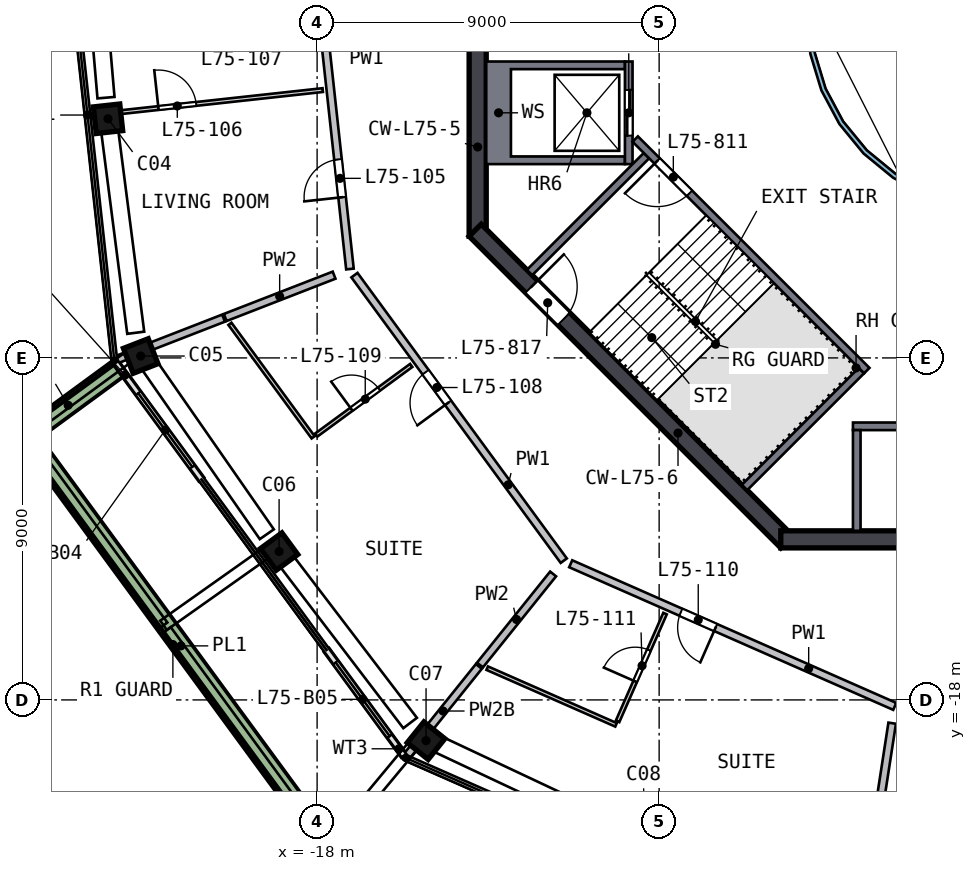
"""IFC4 building model, lengths in metres.
Left out: names, types, materials, properties, quantities, classifications, styles, units other than length and angle.
Written with IfcOpenShell. Run it as: python <this file> out.ifc"""

import sys

from ifc_helpers import new_model, si_unit, direction, frame, frame_2d, origin, origin_2d, place, context, subcontext, project, spatial, polyline, rectangle, outline, extrude, element, fill, save


model = new_model("IFC4")
c1 = context("Model", 3, precision=1e-05, world=origin(), true_north=direction((0.0, 1.0)))
c2 = subcontext(c1, "Body", "Model", "MODEL_VIEW")
j1 = project(units=[si_unit("LENGTHUNIT", "METRE"), si_unit("PLANEANGLEUNIT", "RADIAN")], contexts=[c1])
p1 = place(None, origin())
s1 = spatial("IfcSite", under=j1, at=p1, CompositionType="ELEMENT")
p2 = place(p1, origin())
s2 = spatial("IfcBuilding", under=s1, at=p2, CompositionType="ELEMENT")
p3 = place(p2, frame((0.0, 0.0, 303.0)))
s3 = spatial("IfcBuildingStorey", under=s2, at=p3, CompositionType="ELEMENT", Elevation=303.0)
p4 = place(p3, frame((-23.518, -2.572, 0.0), z_axis=(0.013232359, -0.111790618, 0.99364368), x_axis=(0.108422299, -0.987711126, -0.112567032)))
e1 = element("IfcColumn", 1, at=p4, inside=s3, PredefinedType="COLUMN", context=c2, shape_type="SweptSolid", body=[
    extrude(rectangle(XDim=0.7, YDim=0.7, at=origin_2d()), origin(), (0.0, 0.0, 1.0), 3.21),
])
p5 = place(p3, frame((-22.694, -8.821, 0.0), z_axis=(0.042875436, -0.107492672, 0.993280938), x_axis=(-0.36014885, 0.925689354, 0.115723917)))
e2 = element("IfcColumn", 2, at=p5, inside=s3, PredefinedType="COLUMN", context=c2, shape_type="SweptSolid", body=[
    extrude(rectangle(XDim=0.7, YDim=0.7, at=origin_2d()), origin(), (0.0, 0.0, 1.0), 3.211),
])
p6 = place(p3, frame((-19.082, -13.986, 0.0), z_axis=(0.067302778, -0.090193328, 0.993647573), x_axis=(0.58747426, -0.801380305, -0.112532662)))
e3 = element("IfcColumn", 3, at=p6, inside=s3, PredefinedType="COLUMN", context=c2, shape_type="SweptSolid", body=[
    extrude(rectangle(XDim=0.7, YDim=0.7, at=origin_2d()), origin(), (0.0, 0.0, 1.0), 3.21),
])
p7 = place(p3, frame((-15.243, -18.986, 0.0), z_axis=(0.090919185, -0.0717623, 0.993269286), x_axis=(-0.774414013, 0.621986949, 0.115823882)))
e4 = element("IfcColumn", 4, at=p7, inside=s3, PredefinedType="COLUMN", context=c2, shape_type="SweptSolid", body=[
    extrude(rectangle(XDim=0.7, YDim=0.7, at=origin_2d()), origin(), (0.0, 0.0, 1.0), 3.212),
])
p8 = place(p3, frame((-13.775, 5.799, 0.0), z_axis=(0.0, 0.0, 1.0), x_axis=(0.0, -1.0, 0.0)))
e5 = element("IfcWall", 5, at=p8, inside=s3, PredefinedType="SHEAR", context=c2, shape_type="SweptSolid", body=[
    extrude(rectangle(XDim=11.598, YDim=0.45, at=frame_2d((5.799, 0.0))), origin(), (0.0, 0.0, 1.0), 3.5),
])
p9 = place(p8, frame((4.899, 0.0, 0.0)))
e6 = element("IfcOpeningElement", 6, at=p9, cuts=e5, PredefinedType="OPENING", context=c2, shape_type="SweptSolid", body=[
    extrude(rectangle(XDim=1.8, YDim=2.1, at=frame_2d((0.9, 1.05))), frame((0.0, 0.235, 0.0), z_axis=(0.0, -1.0, 0.0), x_axis=(1.0, 0.0, 0.0)), (0.0, 0.0, 1.0), 0.47),
])
p10 = place(p3, frame((-13.841, -5.64, 0.0), z_axis=(0.0, 0.0, 1.0), x_axis=(0.707106781, -0.707106781, 0.0)))
e7 = element("IfcWall", 7, at=p10, inside=s3, PredefinedType="SHEAR", context=c2, shape_type="SweptSolid", body=[
    extrude(rectangle(XDim=11.598, YDim=0.45, at=frame_2d((5.799, 0.0))), origin(), (0.0, 0.0, 1.0), 3.5),
])
p11 = place(p10, frame((2.099, 0.0, 0.0)))
e8 = element("IfcOpeningElement", 8, at=p11, cuts=e7, PredefinedType="OPENING", context=c2, shape_type="SweptSolid", body=[
    extrude(rectangle(XDim=1.2, YDim=2.1, at=frame_2d((0.6, 1.05))), frame((0.0, 0.235, 0.0), z_axis=(0.0, -1.0, 0.0), x_axis=(1.0, 0.0, 0.0)), (0.0, 0.0, 1.0), 0.47),
])
p12 = place(p3, frame((-5.799, -13.775, 0.0), z_axis=(0.0, 0.0, 1.0), x_axis=(1.0, 0.0, 0.0)))
e9 = element("IfcWall", 9, at=p12, inside=s3, PredefinedType="SHEAR", context=c2, shape_type="SweptSolid", body=[
    extrude(rectangle(XDim=11.598, YDim=0.45, at=frame_2d((5.799, 0.0))), origin(), (0.0, 0.0, 1.0), 3.5),
])
p13 = place(p3, frame((-23.288, -9.135, 0.0), z_axis=(0.0, 0.0, 1.0), x_axis=(0.591184755, -0.806536165, 0.0)))
e10 = element("IfcWall", 10, at=p13, inside=s3, PredefinedType="SOLIDWALL", context=c2, shape_type="SweptSolid", body=[
    extrude(rectangle(XDim=3.787, YDim=0.15, at=frame_2d((1.893, 0.0))), origin(), (0.0, 0.0, 1.0), 2.525),
])
p14 = place(p13, frame((0.987, 0.0, 0.0)))
e11 = element("IfcOpeningElement", 11, at=p14, cuts=e10, PredefinedType="OPENING", context=c2, shape_type="SweptSolid", body=[
    extrude(rectangle(XDim=2.4, YDim=2.4, at=frame_2d((1.2, 1.2))), frame((0.0, 0.085, 0.0), z_axis=(0.0, -1.0, 0.0), x_axis=(1.0, 0.0, 0.0)), (0.0, 0.0, 1.0), 0.17),
])
p15 = place(p3, frame((-17.747, -16.694, 0.0), z_axis=(0.0, 0.0, 1.0), x_axis=(0.591128897, -0.806577105, 0.0)))
e12 = element("IfcWall", 12, at=p15, inside=s3, PredefinedType="SOLIDWALL", context=c2, shape_type="SweptSolid", body=[
    extrude(rectangle(XDim=3.427, YDim=0.15, at=frame_2d((1.713, 0.0))), origin(), (0.0, 0.0, 1.0), 2.525),
])
p16 = place(p15, frame((0.4, 0.0, 0.0)))
e13 = element("IfcOpeningElement", 13, at=p16, cuts=e12, PredefinedType="OPENING", context=c2, shape_type="SweptSolid", body=[
    extrude(rectangle(XDim=2.4, YDim=2.4, at=frame_2d((1.2, 1.2))), frame((0.0, 0.085, 0.0), z_axis=(0.0, -1.0, 0.0), x_axis=(1.0, 0.0, 0.0)), (0.0, 0.0, 1.0), 0.17),
])
p17 = place(p3, frame((-23.261, -9.301, 0.0), z_axis=(0.0, 0.0, 1.0), x_axis=(-0.806545701, -0.591171745, 0.0)))
e14 = element("IfcWall", 14, at=p17, inside=s3, PredefinedType="SOLIDWALL", context=c2, shape_type="SweptSolid", body=[
    extrude(rectangle(XDim=3.199, YDim=0.5, at=frame_2d((1.6, 0.0))), origin(), (0.0, 0.0, 1.0), 0.7),
])
p18 = place(p3, frame((-25.492, -11.245, 0.0), z_axis=(0.0, 0.0, 1.0), x_axis=(0.591166749, -0.806549363, 0.0)))
e15 = element("IfcWall", 15, at=p18, inside=s3, PredefinedType="SOLIDWALL", context=c2, shape_type="SweptSolid", body=[
    extrude(rectangle(XDim=13.224, YDim=0.5, at=frame_2d((6.612, 0.0))), origin(), (0.0, 0.0, 1.0), 0.7),
])
p19 = place(p3, origin())
e16 = element("IfcWall", 16, at=p19, inside=s3, PredefinedType="SOLIDWALL", context=c2, shape_type="SweptSolid", body=[
    extrude(outline(polyline([(-13.55, -3.9), (-13.55, -1.2), (-9.9, -1.2), (-9.9, -1.4), (-12.9, -1.4), (-12.9, -3.7), (-9.9, -3.7), (-9.9, -3.9), (-13.55, -3.9)])), origin(), (0.0, 0.0, 1.0), 3.19),
])
p20 = place(p3, frame((-9.8, -1.2, 0.0), z_axis=(0.0, 0.0, 1.0), x_axis=(0.0, -1.0, 0.0)))
e17 = element("IfcWall", 17, at=p20, inside=s3, PredefinedType="SOLIDWALL", context=c2, shape_type="SweptSolid", body=[
    extrude(rectangle(XDim=2.7, YDim=0.2, at=frame_2d((1.35, 0.0))), origin(), (0.0, 0.0, 1.0), 3.19),
])
p21 = place(p20, frame((0.75, 0.0, 0.0)))
e18 = element("IfcOpeningElement", 18, at=p21, cuts=e17, PredefinedType="OPENING", context=c2, shape_type="SweptSolid", body=[
    extrude(rectangle(XDim=1.2, YDim=2.1, at=frame_2d((0.6, 1.05))), frame((0.0, 0.11, 0.0), z_axis=(0.0, -1.0, 0.0), x_axis=(1.0, 0.0, 0.0)), (0.0, 0.0, 1.0), 0.22),
])
p22 = place(p3, frame((-3.9, -10.8, 0.0), z_axis=(0.0, 0.0, 1.0), x_axis=(1.0, 0.0, 0.0)))
e19 = element("IfcWall", 19, at=p22, inside=s3, PredefinedType="SOLIDWALL", context=c2, shape_type="SweptSolid", body=[
    extrude(rectangle(XDim=7.8, YDim=0.2, at=frame_2d((3.9, 0.0))), origin(), (0.0, 0.0, 1.0), 3.19),
])
p23 = place(p22, frame((3.45, 0.0, 0.0)))
e20 = element("IfcOpeningElement", 20, at=p23, cuts=e19, PredefinedType="OPENING", context=c2, shape_type="SweptSolid", body=[
    extrude(rectangle(XDim=0.9, YDim=2.1, at=frame_2d((0.45, 1.05))), frame((0.0, 0.11, 0.0), z_axis=(0.0, -1.0, 0.0), x_axis=(1.0, 0.0, 0.0)), (0.0, 0.0, 1.0), 0.22),
])
p24 = place(p3, frame((-3.8, -10.9, 0.0), z_axis=(0.0, 0.0, 1.0), x_axis=(0.0, -1.0, 0.0)))
e21 = element("IfcWall", 21, at=p24, inside=s3, PredefinedType="SOLIDWALL", context=c2, shape_type="SweptSolid", body=[
    extrude(rectangle(XDim=2.65, YDim=0.2, at=frame_2d((1.325, 0.0))), origin(), (0.0, 0.0, 1.0), 3.19),
])
p25 = place(p3, frame((-3.535, -9.334, 0.0), z_axis=(0.0, 0.0, 1.0), x_axis=(-0.707120946, 0.707092617, 0.0)))
e22 = element("IfcWall", 22, at=p25, inside=s3, PredefinedType="SOLIDWALL", context=c2, shape_type="SweptSolid", body=[
    extrude(rectangle(XDim=8.618, YDim=0.2, at=frame_2d((4.309, 0.0))), origin(), (0.0, 0.0, 1.0), 3.19),
])
p26 = place(p25, frame((6.6, 0.0, 0.0)))
e23 = element("IfcOpeningElement", 23, at=p26, cuts=e22, PredefinedType="OPENING", context=c2, shape_type="SweptSolid", body=[
    extrude(rectangle(XDim=1.2, YDim=2.1, at=frame_2d((0.6, 1.05))), frame((0.0, 0.11, 0.0), z_axis=(0.0, -1.0, 0.0), x_axis=(1.0, 0.0, 0.0)), (0.0, 0.0, 1.0), 0.22),
])
for number, where, z_axis, x_axis in (
    (24, (-9.334, -3.677, 0.0), (0.0, 0.0, 1.0), (-0.707, -0.707, 0.0)),
    (25, (-3.677, -9.334, 0.0), (0.0, 0.0, 1.0), (-0.707, -0.707, 0.0)),
):
    element("IfcWall", number, at=place(p3, frame(where, z_axis=z_axis, x_axis=x_axis)), inside=s3, PredefinedType="SOLIDWALL", context=c2, shape_type="SweptSolid", body=[
        extrude(rectangle(XDim=4.35, YDim=0.2, at=frame_2d((2.175, 0.0))), origin(), (0.0, 0.0, 1.0), 3.19),
    ])
p27 = place(p3, origin())
e26 = element("IfcWall", 26, at=p27, inside=s3, PredefinedType="SOLIDWALL", context=c2, shape_type="SweptSolid", body=[
    extrude(outline(polyline([(5.021, -0.999), (4.73, -1.959), (4.257, -2.844), (3.62, -3.62), (2.844, -4.257), (1.959, -4.73), (0.999, -5.021), (0.0, -5.12), (-0.999, -5.021), (-1.959, -4.73), (-2.844, -4.257), (-3.62, -3.62), (-4.257, -2.844), (-4.73, -1.959), (-5.021, -0.999), (-5.12, 0.0), (-5.021, 0.999), (-4.73, 1.959), (-4.257, 2.844), (-3.62, 3.62), (-2.844, 4.257), (-1.959, 4.73), (-0.999, 5.021), (0.0, 5.12), (0.999, 5.021), (1.959, 4.73), (2.844, 4.257), (3.62, 3.62), (4.257, 2.844), (4.73, 1.959), (5.021, 0.999), (5.12, 0.0), (5.021, -0.999)]), holes=[polyline([(4.904, 0.976), (4.619, 1.913), (4.157, 2.778), (3.535, 3.535), (2.778, 4.157), (1.913, 4.619), (0.976, 4.904), (0.0, 5.0), (-0.976, 4.904), (-1.913, 4.619), (-2.778, 4.157), (-3.535, 3.535), (-4.157, 2.778), (-4.619, 1.913), (-4.904, 0.976), (-5.0, 0.0), (-4.904, -0.976), (-4.619, -1.913), (-4.157, -2.778), (-3.535, -3.535), (-2.778, -4.157), (-1.913, -4.619), (-0.976, -4.904), (0.0, -5.0), (0.976, -4.904), (1.913, -4.619), (2.778, -4.157), (3.535, -3.535), (4.157, -2.778), (4.619, -1.913), (4.904, -0.976), (5.0, 0.0), (4.904, 0.976)])]), origin(), (0.0, 0.0, 1.0), 3.19),
])
p28 = place(p3, frame((-17.136, -6.66, 0.0), z_axis=(0.0, 0.0, 1.0), x_axis=(-0.108697055, 0.994074922, 0.0)))
e27 = element("IfcWall", 27, at=p28, inside=s3, PredefinedType="SOLIDWALL", context=c2, shape_type="SweptSolid", body=[
    extrude(rectangle(XDim=9.317, YDim=0.2, at=frame_2d((4.658, 0.0))), origin(), (0.0, 0.0, 1.0), 3.19),
])
p29 = place(p28, frame((1.9, 0.0, 0.0)))
e28 = element("IfcOpeningElement", 28, at=p29, cuts=e27, PredefinedType="OPENING", context=c2, shape_type="SweptSolid", body=[
    extrude(rectangle(XDim=1.0, YDim=2.1, at=frame_2d((0.5, 1.05))), frame((0.0, 0.11, 0.0), z_axis=(0.0, -1.0, 0.0), x_axis=(1.0, 0.0, 0.0)), (0.0, 0.0, 1.0), 0.22),
])
p30 = place(p3, frame((-11.51, -14.336, 0.0), z_axis=(0.0, 0.0, 1.0), x_axis=(-0.591167106, 0.806549101, 0.0)))
e29 = element("IfcWall", 29, at=p30, inside=s3, PredefinedType="SOLIDWALL", context=c2, shape_type="SweptSolid", body=[
    extrude(rectangle(XDim=9.316, YDim=0.2, at=frame_2d((4.658, 0.0))), origin(), (0.0, 0.0, 1.0), 3.19),
])
p31 = place(p30, frame((5.15, 0.0, 0.0)))
e30 = element("IfcOpeningElement", 30, at=p31, cuts=e29, PredefinedType="OPENING", context=c2, shape_type="SweptSolid", body=[
    extrude(rectangle(XDim=1.0, YDim=2.1, at=frame_2d((0.5, 1.05))), frame((0.0, 0.11, 0.0), z_axis=(0.0, -1.0, 0.0), x_axis=(1.0, 0.0, 0.0)), (0.0, 0.0, 1.0), 0.22),
])
p32 = place(p3, frame((-2.8, -18.17, 0.0), z_axis=(0.0, 0.0, 1.0), x_axis=(-0.915232324, 0.402926536, 0.0)))
e31 = element("IfcWall", 31, at=p32, inside=s3, PredefinedType="SOLIDWALL", context=c2, shape_type="SweptSolid", body=[
    extrude(rectangle(XDim=9.317, YDim=0.2, at=frame_2d((4.658, 0.0))), origin(), (0.0, 0.0, 1.0), 3.19),
])
p33 = place(p32, frame((5.15, 0.0, 0.0)))
e32 = element("IfcOpeningElement", 32, at=p33, cuts=e31, PredefinedType="OPENING", context=c2, shape_type="SweptSolid", body=[
    extrude(rectangle(XDim=1.0, YDim=2.1, at=frame_2d((0.5, 1.05))), frame((0.0, 0.11, 0.0), z_axis=(0.0, -1.0, 0.0), x_axis=(1.0, 0.0, 0.0)), (0.0, 0.0, 1.0), 0.22),
])
p34 = place(p3, frame((-20.461, -7.953, 0.0), z_axis=(0.0, 0.0, 1.0), x_axis=(-0.932060953, -0.362301505, 0.0)))
e33 = element("IfcWall", 33, at=p34, inside=s3, PredefinedType="SOLIDWALL", context=c2, shape_type="SweptSolid", body=[
    extrude(rectangle(XDim=3.011, YDim=0.2, at=frame_2d((1.506, 0.0))), origin(), (0.0, 0.0, 1.0), 3.19),
])
p35 = place(p3, frame((-17.553, -6.823, 0.0), z_axis=(0.0, 0.0, 1.0), x_axis=(-0.932089582, -0.362227845, 0.0)))
e34 = element("IfcWall", 34, at=p35, inside=s3, PredefinedType="SOLIDWALL", context=c2, shape_type="SweptSolid", body=[
    extrude(rectangle(XDim=3.075, YDim=0.2, at=frame_2d((1.537, 0.0))), origin(), (0.0, 0.0, 1.0), 3.19),
])
p36 = place(p3, frame((-13.744, -17.118, 0.0), z_axis=(0.0, 0.0, 1.0), x_axis=(-0.626058521, -0.779776076, 0.0)))
e35 = element("IfcWall", 35, at=p36, inside=s3, PredefinedType="SOLIDWALL", context=c2, shape_type="SweptSolid", body=[
    extrude(rectangle(XDim=3.011, YDim=0.2, at=frame_2d((1.506, 0.0))), origin(), (0.0, 0.0, 1.0), 2.69),
])
p37 = place(p3, frame((-11.79, -14.685, 0.0), z_axis=(0.0, 0.0, 1.0), x_axis=(-0.626049846, -0.77978304, 0.0)))
e36 = element("IfcWall", 36, at=p37, inside=s3, PredefinedType="SOLIDWALL", context=c2, shape_type="SweptSolid", body=[
    extrude(rectangle(XDim=3.074, YDim=0.2, at=frame_2d((1.537, 0.0))), origin(), (0.0, 0.0, 1.0), 3.19),
])
p38 = place(p3, frame((-3.802, -24.673, 0.0), z_axis=(0.0, 0.0, 1.0), x_axis=(0.152326438, 0.988330237, 0.0)))
e37 = element("IfcWall", 37, at=p38, inside=s3, PredefinedType="SOLIDWALL", context=c2, shape_type="SweptSolid", body=[
    extrude(rectangle(XDim=6.132, YDim=0.2, at=frame_2d((3.066, 0.0))), origin(), (0.0, 0.0, 1.0), 3.19),
])
p39 = place(p3, frame((-23.966, -2.62, 0.0), z_axis=(0.0, 0.0, 1.0), x_axis=(0.994075847, 0.10868859, 0.0)))
e38 = element("IfcWall", 38, at=p39, inside=s3, PredefinedType="PARTITIONING", context=c2, shape_type="SweptSolid", body=[
    extrude(rectangle(XDim=6.15, YDim=0.1, at=frame_2d((3.075, 0.0))), origin(), (0.0, 0.0, 1.0), 3.19),
])
p40 = place(p39, frame((1.8, 0.0, 0.0)))
e39 = element("IfcOpeningElement", 39, at=p40, cuts=e38, PredefinedType="OPENING", context=c2, shape_type="SweptSolid", body=[
    extrude(rectangle(XDim=1.0, YDim=2.1, at=frame_2d((0.5, 1.05))), frame((0.0, 0.06, 0.0), z_axis=(0.0, -1.0, 0.0), x_axis=(1.0, 0.0, 0.0)), (0.0, 0.0, 1.0), 0.12),
])
p41 = place(p3, frame((-18.105, -11.09, 0.0), z_axis=(0.0, 0.0, 1.0), x_axis=(-0.59111503, 0.806587268, 0.0)))
e40 = element("IfcWall", 40, at=p41, inside=s3, PredefinedType="PARTITIONING", context=c2, shape_type="SweptSolid", body=[
    extrude(rectangle(XDim=3.704, YDim=0.1, at=frame_2d((1.852, 0.0))), origin(), (0.0, 0.0, 1.0), 3.19),
])
p42 = place(p3, frame((-18.024, -11.031, 0.0), z_axis=(0.0, 0.0, 1.0), x_axis=(0.806520153, 0.5912066, 0.0)))
e41 = element("IfcWall", 41, at=p42, inside=s3, PredefinedType="PARTITIONING", context=c2, shape_type="SweptSolid", body=[
    extrude(rectangle(XDim=3.1, YDim=0.1, at=frame_2d((1.55, 0.0))), origin(), (0.0, 0.0, 1.0), 3.19),
])
p43 = place(p42, frame((1.15, 0.0, 0.0)))
e42 = element("IfcOpeningElement", 42, at=p43, cuts=e41, PredefinedType="OPENING", context=c2, shape_type="SweptSolid", body=[
    extrude(rectangle(XDim=0.9, YDim=2.1, at=frame_2d((0.45, 1.05))), frame((0.0, 0.06, 0.0), z_axis=(0.0, -1.0, 0.0), x_axis=(1.0, 0.0, 0.0)), (0.0, 0.0, 1.0), 0.12),
])
p44 = place(p3, frame((-10.134, -18.656, 0.0), z_axis=(0.0, 0.0, 1.0), x_axis=(-0.915262542, 0.40285789, 0.0)))
e43 = element("IfcWall", 43, at=p44, inside=s3, PredefinedType="PARTITIONING", context=c2, shape_type="SweptSolid", body=[
    extrude(rectangle(XDim=3.704, YDim=0.1, at=frame_2d((1.852, 0.0))), origin(), (0.0, 0.0, 1.0), 3.19),
])
p45 = place(p3, frame((-10.094, -18.565, 0.0), z_axis=(0.0, 0.0, 1.0), x_axis=(0.402920719, 0.915234885, 0.0)))
e44 = element("IfcWall", 44, at=p45, inside=s3, PredefinedType="PARTITIONING", context=c2, shape_type="SweptSolid", body=[
    extrude(rectangle(XDim=3.1, YDim=0.1, at=frame_2d((1.55, 0.0))), origin(), (0.0, 0.0, 1.0), 3.19),
])
p46 = place(p45, frame((1.15, 0.0, 0.0)))
e45 = element("IfcOpeningElement", 45, at=p46, cuts=e44, PredefinedType="OPENING", context=c2, shape_type="SweptSolid", body=[
    extrude(rectangle(XDim=0.9, YDim=2.1, at=frame_2d((0.45, 1.05))), frame((0.0, 0.06, 0.0), z_axis=(0.0, -1.0, 0.0), x_axis=(1.0, 0.0, 0.0)), (0.0, 0.0, 1.0), 0.12),
])
p47 = place(p14, origin())
e46 = element("IfcDoor", 46, at=p47, inside=s3, OperationType="SLIDING_TO_LEFT", PredefinedType="DOOR", context=c2, shape_type="SweptSolid", body=[
    extrude(rectangle(XDim=2.4, YDim=2.4, at=frame_2d((1.2, 1.2))), frame((0.0, 0.025, 0.0), z_axis=(0.0, -1.0, 0.0), x_axis=(1.0, 0.0, 0.0)), (0.0, 0.0, 1.0), 0.05),
])
fill(e11, e46)
p48 = place(p16, origin())
e47 = element("IfcDoor", 47, at=p48, inside=s3, OperationType="SLIDING_TO_RIGHT", PredefinedType="DOOR", context=c2, shape_type="SweptSolid", body=[
    extrude(rectangle(XDim=2.4, YDim=2.4, at=frame_2d((1.2, 1.2))), frame((0.0, 0.025, 0.0), z_axis=(0.0, -1.0, 0.0), x_axis=(1.0, 0.0, 0.0)), (0.0, 0.0, 1.0), 0.05),
])
fill(e13, e47)
p49 = place(p21, origin())
e48 = element("IfcDoor", 48, at=p49, inside=s3, OperationType="DOUBLE_DOOR_SLIDING", PredefinedType="DOOR", context=c2, shape_type="SweptSolid", body=[
    extrude(rectangle(XDim=1.2, YDim=2.1, at=frame_2d((0.6, 1.05))), frame((0.0, 0.025, 0.0), z_axis=(0.0, -1.0, 0.0), x_axis=(1.0, 0.0, 0.0)), (0.0, 0.0, 1.0), 0.05),
])
fill(e18, e48)
p50 = place(p26, origin())
e49 = element("IfcDoor", 49, at=p50, inside=s3, OperationType="SINGLE_SWING_RIGHT", PredefinedType="DOOR", context=c2, shape_type="SweptSolid", body=[
    extrude(rectangle(XDim=1.2, YDim=2.1, at=frame_2d((0.6, 1.05))), frame((0.0, 0.025, 0.0), z_axis=(0.0, -1.0, 0.0), x_axis=(1.0, 0.0, 0.0)), (0.0, 0.0, 1.0), 0.05),
])
fill(e23, e49)
p51 = place(p11, origin())
e50 = element("IfcDoor", 50, at=p51, inside=s3, OperationType="SINGLE_SWING_LEFT", PredefinedType="DOOR", context=c2, shape_type="SweptSolid", body=[
    extrude(rectangle(XDim=1.2, YDim=2.1, at=frame_2d((0.6, 1.05))), frame((0.0, 0.025, 0.0), z_axis=(0.0, -1.0, 0.0), x_axis=(1.0, 0.0, 0.0)), (0.0, 0.0, 1.0), 0.05),
])
fill(e8, e50)
p52 = place(p29, origin())
e51 = element("IfcDoor", 51, at=p52, inside=s3, OperationType="SINGLE_SWING_LEFT", PredefinedType="DOOR", context=c2, shape_type="SweptSolid", body=[
    extrude(rectangle(XDim=1.0, YDim=2.1, at=frame_2d((0.5, 1.05))), frame((0.0, 0.025, 0.0), z_axis=(0.0, -1.0, 0.0), x_axis=(1.0, 0.0, 0.0)), (0.0, 0.0, 1.0), 0.05),
])
fill(e28, e51)
p53 = place(p40, origin())
e52 = element("IfcDoor", 52, at=p53, inside=s3, OperationType="SINGLE_SWING_LEFT", PredefinedType="DOOR", context=c2, shape_type="SweptSolid", body=[
    extrude(rectangle(XDim=1.0, YDim=2.1, at=frame_2d((0.5, 1.05))), frame((0.0, 0.025, 0.0), z_axis=(0.0, -1.0, 0.0), x_axis=(1.0, 0.0, 0.0)), (0.0, 0.0, 1.0), 0.05),
])
fill(e39, e52)
p54 = place(p31, origin())
e53 = element("IfcDoor", 53, at=p54, inside=s3, OperationType="SINGLE_SWING_LEFT", PredefinedType="DOOR", context=c2, shape_type="SweptSolid", body=[
    extrude(rectangle(XDim=1.0, YDim=2.1, at=frame_2d((0.5, 1.05))), frame((0.0, 0.025, 0.0), z_axis=(0.0, -1.0, 0.0), x_axis=(1.0, 0.0, 0.0)), (0.0, 0.0, 1.0), 0.05),
])
fill(e30, e53)
p55 = place(p43, origin())
e54 = element("IfcDoor", 54, at=p55, inside=s3, OperationType="SINGLE_SWING_LEFT", PredefinedType="DOOR", context=c2, shape_type="SweptSolid", body=[
    extrude(rectangle(XDim=0.9, YDim=2.1, at=frame_2d((0.45, 1.05))), frame((0.0, 0.025, 0.0), z_axis=(0.0, -1.0, 0.0), x_axis=(1.0, 0.0, 0.0)), (0.0, 0.0, 1.0), 0.05),
])
fill(e42, e54)
p56 = place(p33, origin())
e55 = element("IfcDoor", 55, at=p56, inside=s3, OperationType="SINGLE_SWING_LEFT", PredefinedType="DOOR", context=c2, shape_type="SweptSolid", body=[
    extrude(rectangle(XDim=1.0, YDim=2.1, at=frame_2d((0.5, 1.05))), frame((0.0, 0.025, 0.0), z_axis=(0.0, -1.0, 0.0), x_axis=(1.0, 0.0, 0.0)), (0.0, 0.0, 1.0), 0.05),
])
fill(e32, e55)
p57 = place(p46, origin())
e56 = element("IfcDoor", 56, at=p57, inside=s3, OperationType="SINGLE_SWING_LEFT", PredefinedType="DOOR", context=c2, shape_type="SweptSolid", body=[
    extrude(rectangle(XDim=0.9, YDim=2.1, at=frame_2d((0.45, 1.05))), frame((0.0, 0.025, 0.0), z_axis=(0.0, -1.0, 0.0), x_axis=(1.0, 0.0, 0.0)), (0.0, 0.0, 1.0), 0.05),
])
fill(e45, e56)
save(model, sys.argv[1])
